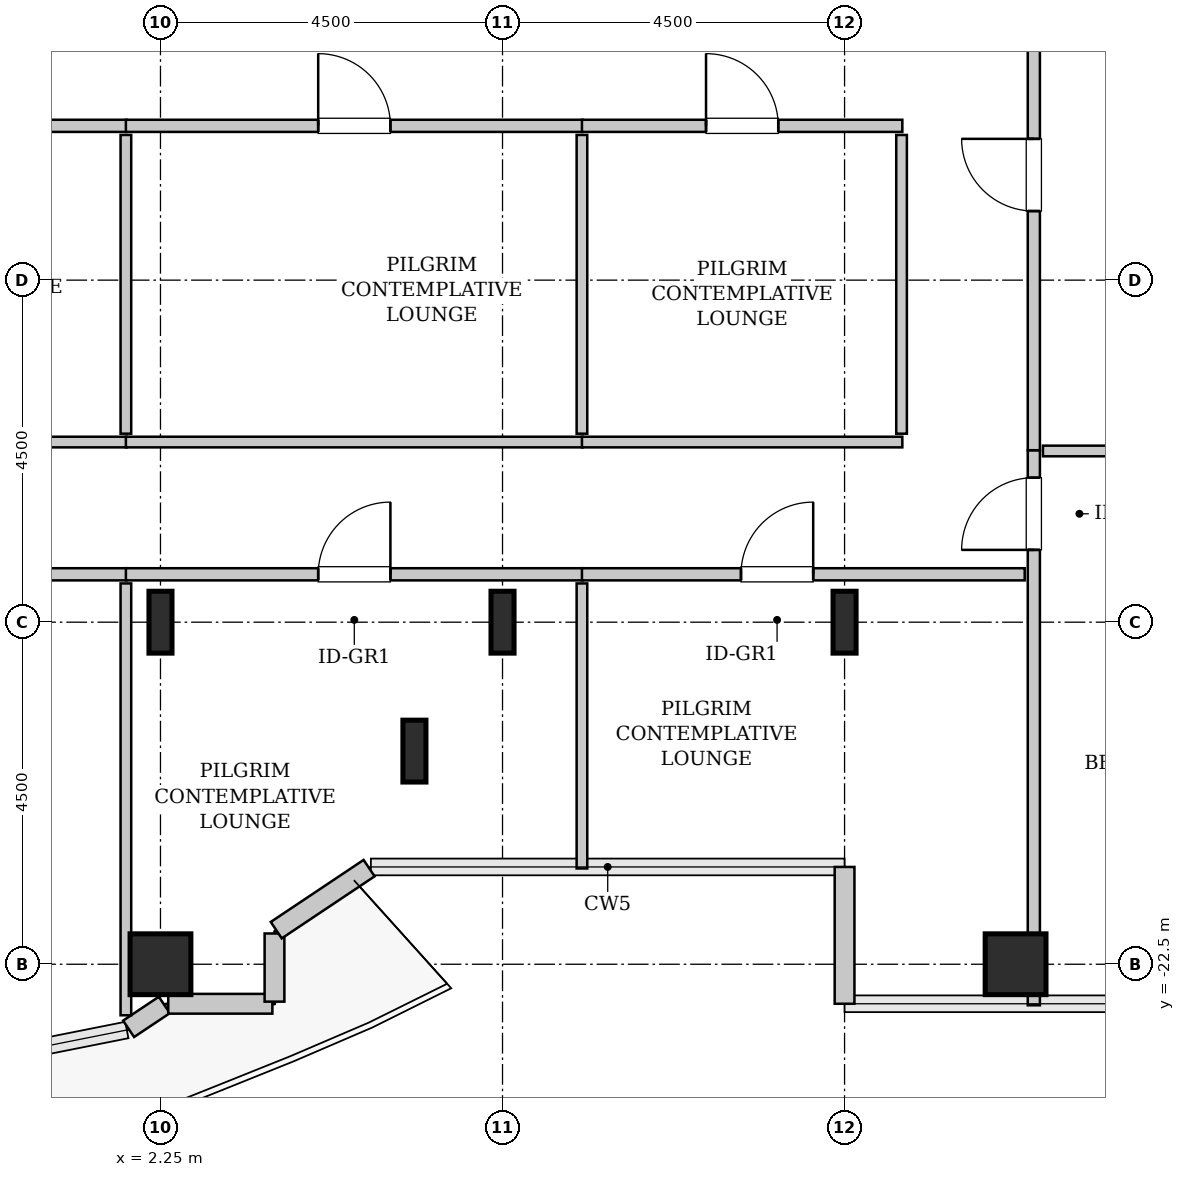
"""IFC4 building model, lengths in metres.
Left out: names, types, materials, properties, quantities, classifications, styles, units other than length and angle.
Written with IfcOpenShell. Run it as: python <this file> out.ifc"""

import sys

from ifc_helpers import new_model, si_unit, direction, frame, frame_2d, origin, origin_2d, place, context, subcontext, project, spatial, rectangle, hollow_rectangle, i_section, extrude, source, transform, mapped, element, fill, save


model = new_model("IFC4")
c1 = context("Model", 3, precision=1e-05, world=origin(), true_north=direction((0.0, 1.0)))
c2 = subcontext(c1, "Body", "Model", "MODEL_VIEW")
j1 = project(units=[si_unit("LENGTHUNIT", "METRE"), si_unit("PLANEANGLEUNIT", "RADIAN")], contexts=[c1])
p1 = place(None, origin())
s1 = spatial("IfcSite", under=j1, at=p1, CompositionType="ELEMENT")
p2 = place(p1, origin())
s2 = spatial("IfcBuilding", under=s1, at=p2, CompositionType="ELEMENT")
p3 = place(p2, frame((0.0, 0.0, 171.6)))
s3 = spatial("IfcBuildingStorey", under=s2, at=p3, CompositionType="ELEMENT", Elevation=171.6)
m1 = source(origin(), c2, "Body", "SweptSolid", [
    extrude(hollow_rectangle(XDim=0.8, YDim=0.8, WallThickness=0.04, InnerFilletRadius=0.04, OuterFilletRadius=0.08, at=origin_2d()), origin(), (0.0, 0.0, 1.0), 3.8),
])
p4 = place(p3, frame((2.25, -22.5, 0.0), z_axis=(0.0, 0.0, 1.0), x_axis=(1.0, 0.0, 0.0)))
e1 = element("IfcColumn", 1, at=p4, inside=s3, PredefinedType="COLUMN", context=c2, shape_type="MappedRepresentation", body=[
    mapped(m1, transform((0.0, 0.0, 0.0), x_axis=(1.0, 0.0, 0.0), y_axis=(0.0, 1.0, 0.0), z_axis=(0.0, 0.0, 1.0), scale=1.0)),
])
m2 = source(origin(), c2, "Body", "SweptSolid", [
    extrude(i_section(OverallWidth=0.303, OverallDepth=0.814, WebThickness=0.021, FlangeThickness=0.04, FilletRadius=0.03, at=origin_2d()), origin(), (0.0, 0.0, 1.0), 3.8),
])
for number, where, z_axis, x_axis in (
    (2, (2.25, -18.0, 0.0), (0.0, 0.0, 1.0), (1.0, 0.0, 0.0)),
    (3, (5.591, -19.696, 0.0), (0.0, 0.0, 1.0), (1.0, 0.0, 0.0)),
    (4, (6.75, -18.0, 0.0), (0.0, 0.0, 1.0), (1.0, 0.0, 0.0)),
    (5, (11.25, -18.0, 0.0), (0.0, 0.0, 1.0), (1.0, 0.0, 0.0)),
):
    element("IfcColumn", number, at=place(p3, frame(where, z_axis=z_axis, x_axis=x_axis)), inside=s3, PredefinedType="COLUMN", context=c2, shape_type="MappedRepresentation", body=[
        mapped(m2, transform((0.0, 0.0, 0.0), x_axis=(1.0, 0.0, 0.0), y_axis=(0.0, 1.0, 0.0), z_axis=(0.0, 0.0, 1.0), scale=1.0)),
    ])
p5 = place(p3, frame((13.5, -22.5, 0.0), z_axis=(0.0, 0.0, 1.0), x_axis=(1.0, 0.0, 0.0)))
e6 = element("IfcColumn", 6, at=p5, inside=s3, PredefinedType="COLUMN", context=c2, shape_type="MappedRepresentation", body=[
    mapped(m1, transform((0.0, 0.0, 0.0), x_axis=(1.0, 0.0, 0.0), y_axis=(0.0, 1.0, 0.0), z_axis=(0.0, 0.0, 1.0), scale=1.0)),
])
m3 = source(origin(), c2, "Body", "SweptSolid", [
    extrude(rectangle(XDim=1.8, YDim=0.26, at=frame_2d((0.9, 0.0))), origin(), (0.0, 0.0, 1.0), 3.55),
])
p6 = place(p3, frame((11.25, -21.22, 0.0), z_axis=(0.0, 0.0, 1.0), x_axis=(0.0, -1.0, 0.0)))
e7 = element("IfcWall", 7, at=p6, inside=s3, PredefinedType="SOLIDWALL", context=c2, shape_type="MappedRepresentation", body=[
    mapped(m3, transform((0.0, 0.0, 0.0), x_axis=(1.0, 0.0, 0.0), y_axis=(0.0, 1.0, 0.0), z_axis=(0.0, 0.0, 1.0), scale=1.0)),
])
m4 = source(origin(), c2, "Body", "SweptSolid", [
    extrude(rectangle(XDim=0.565, YDim=0.26, at=frame_2d((0.283, 0.0))), origin(), (0.0, 0.0, 1.0), 3.55),
])
p7 = place(p3, frame((1.831, -23.35, 0.0), z_axis=(0.0, 0.0, 1.0), x_axis=(0.831651492666, 0.555297933317, 0.0)))
e8 = element("IfcWall", 8, at=p7, inside=s3, PredefinedType="SOLIDWALL", context=c2, shape_type="MappedRepresentation", body=[
    mapped(m4, transform((0.0, 0.0, 0.0), x_axis=(1.0, 0.0, 0.0), y_axis=(0.0, 1.0, 0.0), z_axis=(0.0, 0.0, 1.0), scale=1.0)),
])
m5 = source(origin(), c2, "Body", "SweptSolid", [
    extrude(rectangle(XDim=1.37, YDim=0.26, at=frame_2d((0.685, 0.0))), origin(), (0.0, 0.0, 1.0), 3.55),
])
p8 = place(p3, frame((2.352, -23.02, 0.0), z_axis=(0.0, 0.0, 1.0), x_axis=(1.0, 0.0, 0.0)))
e9 = element("IfcWall", 9, at=p8, inside=s3, PredefinedType="SOLIDWALL", context=c2, shape_type="MappedRepresentation", body=[
    mapped(m5, transform((0.0, 0.0, 0.0), x_axis=(1.0, 0.0, 0.0), y_axis=(0.0, 1.0, 0.0), z_axis=(0.0, 0.0, 1.0), scale=1.0)),
])
m6 = source(origin(), c2, "Body", "SweptSolid", [
    extrude(rectangle(XDim=0.897, YDim=0.26, at=frame_2d((0.448, 0.0))), origin(), (0.0, 0.0, 1.0), 3.55),
])
p9 = place(p3, frame((3.75, -22.992, 0.0), z_axis=(0.0, 0.0, 1.0), x_axis=(0.0, 1.0, 0.0)))
e10 = element("IfcWall", 10, at=p9, inside=s3, PredefinedType="SOLIDWALL", context=c2, shape_type="MappedRepresentation", body=[
    mapped(m6, transform((0.0, 0.0, 0.0), x_axis=(1.0, 0.0, 0.0), y_axis=(0.0, 1.0, 0.0), z_axis=(0.0, 0.0, 1.0), scale=1.0)),
])
m7 = source(origin(), c2, "Body", "SweptSolid", [
    extrude(rectangle(XDim=1.469, YDim=0.26, at=frame_2d((0.734, 0.0))), origin(), (0.0, 0.0, 1.0), 3.55),
])
p10 = place(p3, frame((3.773, -22.052, 0.0), z_axis=(0.0, 0.0, 1.0), x_axis=(0.831461760506, 0.555581983884, 0.0)))
e11 = element("IfcWall", 11, at=p10, inside=s3, PredefinedType="SOLIDWALL", context=c2, shape_type="MappedRepresentation", body=[
    mapped(m7, transform((0.0, 0.0, 0.0), x_axis=(1.0, 0.0, 0.0), y_axis=(0.0, 1.0, 0.0), z_axis=(0.0, 0.0, 1.0), scale=1.0)),
])
m8 = source(origin(), c2, "Body", "SweptSolid", [
    extrude(rectangle(XDim=7.302, YDim=0.16, at=frame_2d((3.651, 0.0))), origin(), (0.0, 0.0, 1.0), 3.535),
])
p11 = place(p3, frame((13.74, -23.04, 0.0), z_axis=(0.0, 0.0, 1.0), x_axis=(0.0, 1.0, 0.0)))
e12 = element("IfcWall", 12, at=p11, inside=s3, PredefinedType="PARTITIONING", context=c2, shape_type="MappedRepresentation", body=[
    mapped(m8, transform((0.0, 0.0, 0.0), x_axis=(1.0, 0.0, 0.0), y_axis=(0.0, 1.0, 0.0), z_axis=(0.0, 0.0, 1.0), scale=1.0)),
])
p12 = place(p11, frame((5.991, 0.0, 0.0)))
e13 = element("IfcOpeningElement", 13, at=p12, cuts=e12, PredefinedType="OPENING", context=c2, shape_type="SweptSolid", body=[
    extrude(rectangle(XDim=0.95, YDim=2.1, at=frame_2d((0.475, 1.05))), frame((0.0, 0.09, 0.0), z_axis=(0.0, -1.0, 0.0), x_axis=(1.0, 0.0, 0.0)), (0.0, 0.0, 1.0), 0.18),
])
m9 = source(origin(), c2, "Body", "SweptSolid", [
    extrude(rectangle(XDim=11.43, YDim=0.14, at=frame_2d((5.715, 0.0))), origin(), (0.0, 0.0, 1.0), 3.535),
])
p13 = place(p3, frame((13.86, -15.748, 0.0), z_axis=(0.0, 0.0, 1.0), x_axis=(1.0, 0.0, 0.0)))
e14 = element("IfcWall", 14, at=p13, inside=s3, PredefinedType="PARTITIONING", context=c2, shape_type="MappedRepresentation", body=[
    mapped(m9, transform((0.0, 0.0, 0.0), x_axis=(1.0, 0.0, 0.0), y_axis=(0.0, 1.0, 0.0), z_axis=(0.0, 0.0, 1.0), scale=1.0)),
])
m10 = source(origin(), c2, "Body", "SweptSolid", [
    extrude(rectangle(XDim=7.242, YDim=0.16, at=frame_2d((3.621, 0.0))), origin(), (0.0, 0.0, 1.0), 3.535),
])
p14 = place(p3, frame((13.74, -15.738, 0.0), z_axis=(0.0, 0.0, 1.0), x_axis=(0.0, 1.0, 0.0)))
e15 = element("IfcWall", 15, at=p14, inside=s3, PredefinedType="PARTITIONING", context=c2, shape_type="MappedRepresentation", body=[
    mapped(m10, transform((0.0, 0.0, 0.0), x_axis=(1.0, 0.0, 0.0), y_axis=(0.0, 1.0, 0.0), z_axis=(0.0, 0.0, 1.0), scale=1.0)),
])
p15 = place(p14, frame((3.146, 0.0, 0.0)))
e16 = element("IfcOpeningElement", 16, at=p15, cuts=e15, PredefinedType="OPENING", context=c2, shape_type="SweptSolid", body=[
    extrude(rectangle(XDim=0.95, YDim=2.1, at=frame_2d((0.475, 1.05))), frame((0.0, 0.09, 0.0), z_axis=(0.0, -1.0, 0.0), x_axis=(1.0, 0.0, 0.0)), (0.0, 0.0, 1.0), 0.18),
])
m11 = source(origin(), c2, "Body", "SweptSolid", [
    extrude(rectangle(XDim=7.01, YDim=0.16, at=frame_2d((3.505, 0.0))), origin(), (0.0, 0.0, 1.0), 3.535),
])
p16 = place(p3, frame((-5.205, -17.37, 0.0), z_axis=(0.0, 0.0, 1.0), x_axis=(1.0, 0.0, 0.0)))
e17 = element("IfcWall", 17, at=p16, inside=s3, PredefinedType="PARTITIONING", context=c2, shape_type="MappedRepresentation", body=[
    mapped(m11, transform((0.0, 0.0, 0.0), x_axis=(1.0, 0.0, 0.0), y_axis=(0.0, 1.0, 0.0), z_axis=(0.0, 0.0, 1.0), scale=1.0)),
])
p17 = place(p16, frame((3.47, 0.0, 0.0)))
e18 = element("IfcOpeningElement", 18, at=p17, cuts=e17, PredefinedType="OPENING", context=c2, shape_type="SweptSolid", body=[
    extrude(rectangle(XDim=0.95, YDim=2.1, at=frame_2d((0.475, 1.05))), frame((0.0, 0.09, 0.0), z_axis=(0.0, -1.0, 0.0), x_axis=(1.0, 0.0, 0.0)), (0.0, 0.0, 1.0), 0.18),
])
m12 = source(origin(), c2, "Body", "SweptSolid", [
    extrude(rectangle(XDim=5.681, YDim=0.14, at=frame_2d((2.841, 0.0))), origin(), (0.0, 0.0, 1.0), 2.875),
])
p18 = place(p3, frame((1.795, -23.171, 0.0), z_axis=(0.0, 0.0, 1.0), x_axis=(0.0, 1.0, 0.0)))
e19 = element("IfcWall", 19, at=p18, inside=s3, PredefinedType="PARTITIONING", context=c2, shape_type="MappedRepresentation", body=[
    mapped(m12, transform((0.0, 0.0, 0.0), x_axis=(1.0, 0.0, 0.0), y_axis=(0.0, 1.0, 0.0), z_axis=(0.0, 0.0, 1.0), scale=1.0)),
])
p19 = place(p3, frame((-5.205, -11.47, 0.0), z_axis=(0.0, 0.0, 1.0), x_axis=(1.0, 0.0, 0.0)))
e20 = element("IfcWall", 20, at=p19, inside=s3, PredefinedType="PARTITIONING", context=c2, shape_type="MappedRepresentation", body=[
    mapped(m11, transform((0.0, 0.0, 0.0), x_axis=(1.0, 0.0, 0.0), y_axis=(0.0, 1.0, 0.0), z_axis=(0.0, 0.0, 1.0), scale=1.0)),
])
p20 = place(p19, frame((3.03, 0.0, 0.0)))
e21 = element("IfcOpeningElement", 21, at=p20, cuts=e20, PredefinedType="OPENING", context=c2, shape_type="SweptSolid", body=[
    extrude(rectangle(XDim=0.95, YDim=2.1, at=frame_2d((0.475, 1.05))), frame((0.0, 0.09, 0.0), z_axis=(0.0, -1.0, 0.0), x_axis=(1.0, 0.0, 0.0)), (0.0, 0.0, 1.0), 0.18),
])
m13 = source(origin(), c2, "Body", "SweptSolid", [
    extrude(rectangle(XDim=7.01, YDim=0.14, at=frame_2d((3.505, 0.0))), origin(), (0.0, 0.0, 1.0), 3.535),
])
p21 = place(p3, frame((-5.205, -15.63, 0.0), z_axis=(0.0, 0.0, 1.0), x_axis=(1.0, 0.0, 0.0)))
e22 = element("IfcWall", 22, at=p21, inside=s3, PredefinedType="PARTITIONING", context=c2, shape_type="MappedRepresentation", body=[
    mapped(m13, transform((0.0, 0.0, 0.0), x_axis=(1.0, 0.0, 0.0), y_axis=(0.0, 1.0, 0.0), z_axis=(0.0, 0.0, 1.0), scale=1.0)),
])
m14 = source(origin(), c2, "Body", "SweptSolid", [
    extrude(rectangle(XDim=3.93, YDim=0.14, at=frame_2d((1.965, 0.0))), origin(), (0.0, 0.0, 1.0), 3.535),
])
p22 = place(p3, frame((1.795, -15.52, 0.0), z_axis=(0.0, 0.0, 1.0), x_axis=(0.0, 1.0, 0.0)))
e23 = element("IfcWall", 23, at=p22, inside=s3, PredefinedType="PARTITIONING", context=c2, shape_type="MappedRepresentation", body=[
    mapped(m14, transform((0.0, 0.0, 0.0), x_axis=(1.0, 0.0, 0.0), y_axis=(0.0, 1.0, 0.0), z_axis=(0.0, 0.0, 1.0), scale=1.0)),
])
m15 = source(origin(), c2, "Body", "SweptSolid", [
    extrude(rectangle(XDim=6.01, YDim=0.16, at=frame_2d((3.005, 0.0))), origin(), (0.0, 0.0, 1.0), 3.535),
])
p23 = place(p3, frame((1.795, -17.37, 0.0), z_axis=(0.0, 0.0, 1.0), x_axis=(1.0, 0.0, 0.0)))
e24 = element("IfcWall", 24, at=p23, inside=s3, PredefinedType="PARTITIONING", context=c2, shape_type="MappedRepresentation", body=[
    mapped(m15, transform((0.0, 0.0, 0.0), x_axis=(1.0, 0.0, 0.0), y_axis=(0.0, 1.0, 0.0), z_axis=(0.0, 0.0, 1.0), scale=1.0)),
])
p24 = place(p23, frame((2.53, 0.0, 0.0)))
e25 = element("IfcOpeningElement", 25, at=p24, cuts=e24, PredefinedType="OPENING", context=c2, shape_type="SweptSolid", body=[
    extrude(rectangle(XDim=0.95, YDim=2.1, at=frame_2d((0.475, 1.05))), frame((0.0, 0.09, 0.0), z_axis=(0.0, -1.0, 0.0), x_axis=(1.0, 0.0, 0.0)), (0.0, 0.0, 1.0), 0.18),
])
m16 = source(origin(), c2, "Body", "SweptSolid", [
    extrude(rectangle(XDim=3.75, YDim=0.14, at=frame_2d((1.875, 0.0))), origin(), (0.0, 0.0, 1.0), 3.535),
])
p25 = place(p3, frame((7.795, -21.24, 0.0), z_axis=(0.0, 0.0, 1.0), x_axis=(0.0, 1.0, 0.0)))
e26 = element("IfcWall", 26, at=p25, inside=s3, PredefinedType="PARTITIONING", context=c2, shape_type="MappedRepresentation", body=[
    mapped(m16, transform((0.0, 0.0, 0.0), x_axis=(1.0, 0.0, 0.0), y_axis=(0.0, 1.0, 0.0), z_axis=(0.0, 0.0, 1.0), scale=1.0)),
])
p26 = place(p3, frame((1.795, -11.47, 0.0), z_axis=(0.0, 0.0, 1.0), x_axis=(1.0, 0.0, 0.0)))
e27 = element("IfcWall", 27, at=p26, inside=s3, PredefinedType="PARTITIONING", context=c2, shape_type="MappedRepresentation", body=[
    mapped(m15, transform((0.0, 0.0, 0.0), x_axis=(1.0, 0.0, 0.0), y_axis=(0.0, 1.0, 0.0), z_axis=(0.0, 0.0, 1.0), scale=1.0)),
])
p27 = place(p26, frame((2.53, 0.0, 0.0)))
e28 = element("IfcOpeningElement", 28, at=p27, cuts=e27, PredefinedType="OPENING", context=c2, shape_type="SweptSolid", body=[
    extrude(rectangle(XDim=0.95, YDim=2.1, at=frame_2d((0.475, 1.05))), frame((0.0, 0.09, 0.0), z_axis=(0.0, -1.0, 0.0), x_axis=(1.0, 0.0, 0.0)), (0.0, 0.0, 1.0), 0.18),
])
m17 = source(origin(), c2, "Body", "SweptSolid", [
    extrude(rectangle(XDim=6.01, YDim=0.14, at=frame_2d((3.005, 0.0))), origin(), (0.0, 0.0, 1.0), 3.535),
])
p28 = place(p3, frame((1.795, -15.63, 0.0), z_axis=(0.0, 0.0, 1.0), x_axis=(1.0, 0.0, 0.0)))
e29 = element("IfcWall", 29, at=p28, inside=s3, PredefinedType="PARTITIONING", context=c2, shape_type="MappedRepresentation", body=[
    mapped(m17, transform((0.0, 0.0, 0.0), x_axis=(1.0, 0.0, 0.0), y_axis=(0.0, 1.0, 0.0), z_axis=(0.0, 0.0, 1.0), scale=1.0)),
])
p29 = place(p3, frame((7.795, -15.52, 0.0), z_axis=(0.0, 0.0, 1.0), x_axis=(0.0, 1.0, 0.0)))
e30 = element("IfcWall", 30, at=p29, inside=s3, PredefinedType="PARTITIONING", context=c2, shape_type="MappedRepresentation", body=[
    mapped(m14, transform((0.0, 0.0, 0.0), x_axis=(1.0, 0.0, 0.0), y_axis=(0.0, 1.0, 0.0), z_axis=(0.0, 0.0, 1.0), scale=1.0)),
])
m18 = source(origin(), c2, "Body", "SweptSolid", [
    extrude(rectangle(XDim=5.825, YDim=0.16, at=frame_2d((2.913, 0.0))), origin(), (0.0, 0.0, 1.0), 3.535),
])
p30 = place(p3, frame((7.795, -17.37, 0.0), z_axis=(0.0, 0.0, 1.0), x_axis=(1.0, 0.0, 0.0)))
e31 = element("IfcWall", 31, at=p30, inside=s3, PredefinedType="PARTITIONING", context=c2, shape_type="MappedRepresentation", body=[
    mapped(m18, transform((0.0, 0.0, 0.0), x_axis=(1.0, 0.0, 0.0), y_axis=(0.0, 1.0, 0.0), z_axis=(0.0, 0.0, 1.0), scale=1.0)),
])
p31 = place(p30, frame((2.092, 0.0, 0.0)))
e32 = element("IfcOpeningElement", 32, at=p31, cuts=e31, PredefinedType="OPENING", context=c2, shape_type="SweptSolid", body=[
    extrude(rectangle(XDim=0.95, YDim=2.1, at=frame_2d((0.475, 1.05))), frame((0.0, 0.09, 0.0), z_axis=(0.0, -1.0, 0.0), x_axis=(1.0, 0.0, 0.0)), (0.0, 0.0, 1.0), 0.18),
])
m19 = source(origin(), c2, "Body", "SweptSolid", [
    extrude(rectangle(XDim=4.215, YDim=0.16, at=frame_2d((2.107, 0.0))), origin(), (0.0, 0.0, 1.0), 3.535),
])
p32 = place(p3, frame((7.795, -11.47, 0.0), z_axis=(0.0, 0.0, 1.0), x_axis=(1.0, 0.0, 0.0)))
e33 = element("IfcWall", 33, at=p32, inside=s3, PredefinedType="PARTITIONING", context=c2, shape_type="MappedRepresentation", body=[
    mapped(m19, transform((0.0, 0.0, 0.0), x_axis=(1.0, 0.0, 0.0), y_axis=(0.0, 1.0, 0.0), z_axis=(0.0, 0.0, 1.0), scale=1.0)),
])
p33 = place(p32, frame((1.633, 0.0, 0.0)))
e34 = element("IfcOpeningElement", 34, at=p33, cuts=e33, PredefinedType="OPENING", context=c2, shape_type="SweptSolid", body=[
    extrude(rectangle(XDim=0.95, YDim=2.1, at=frame_2d((0.475, 1.05))), frame((0.0, 0.09, 0.0), z_axis=(0.0, -1.0, 0.0), x_axis=(1.0, 0.0, 0.0)), (0.0, 0.0, 1.0), 0.18),
])
m20 = source(origin(), c2, "Body", "SweptSolid", [
    extrude(rectangle(XDim=4.215, YDim=0.14, at=frame_2d((2.107, 0.0))), origin(), (0.0, 0.0, 1.0), 3.535),
])
p34 = place(p3, frame((7.795, -15.63, 0.0), z_axis=(0.0, 0.0, 1.0), x_axis=(1.0, 0.0, 0.0)))
e35 = element("IfcWall", 35, at=p34, inside=s3, PredefinedType="PARTITIONING", context=c2, shape_type="MappedRepresentation", body=[
    mapped(m20, transform((0.0, 0.0, 0.0), x_axis=(1.0, 0.0, 0.0), y_axis=(0.0, 1.0, 0.0), z_axis=(0.0, 0.0, 1.0), scale=1.0)),
])
p35 = place(p3, frame((12.0, -15.52, 0.0), z_axis=(0.0, 0.0, 1.0), x_axis=(0.0, 1.0, 0.0)))
e36 = element("IfcWall", 36, at=p35, inside=s3, PredefinedType="PARTITIONING", context=c2, shape_type="MappedRepresentation", body=[
    mapped(m14, transform((0.0, 0.0, 0.0), x_axis=(1.0, 0.0, 0.0), y_axis=(0.0, 1.0, 0.0), z_axis=(0.0, 0.0, 1.0), scale=1.0)),
])
m21 = source(origin(), c2, "Body", "SweptSolid", [
    extrude(rectangle(XDim=0.95, YDim=2.1, at=frame_2d((0.475, 1.05))), frame((0.0, 0.025, 0.0), z_axis=(0.0, -1.0, 0.0), x_axis=(1.0, 0.0, 0.0)), (0.0, 0.0, 1.0), 0.05),
])
p36 = place(p12, origin())
e37 = element("IfcDoor", 37, at=p36, inside=s3, OperationType="SINGLE_SWING_LEFT", PredefinedType="DOOR", context=c2, shape_type="MappedRepresentation", body=[
    mapped(m21, transform((0.0, 0.0, 0.0), x_axis=(1.0, 0.0, 0.0), y_axis=(0.0, 1.0, 0.0), z_axis=(0.0, 0.0, 1.0), scale=1.0)),
])
fill(e13, e37)
p37 = place(p15, origin())
e38 = element("IfcDoor", 38, at=p37, inside=s3, OperationType="SINGLE_SWING_RIGHT", PredefinedType="DOOR", context=c2, shape_type="MappedRepresentation", body=[
    mapped(m21, transform((0.0, 0.0, 0.0), x_axis=(1.0, 0.0, 0.0), y_axis=(0.0, 1.0, 0.0), z_axis=(0.0, 0.0, 1.0), scale=1.0)),
])
fill(e16, e38)
p38 = place(p24, origin())
e39 = element("IfcDoor", 39, at=p38, inside=s3, OperationType="SINGLE_SWING_RIGHT", PredefinedType="DOOR", context=c2, shape_type="MappedRepresentation", body=[
    mapped(m21, transform((0.0, 0.0, 0.0), x_axis=(1.0, 0.0, 0.0), y_axis=(0.0, 1.0, 0.0), z_axis=(0.0, 0.0, 1.0), scale=1.0)),
])
fill(e25, e39)
p39 = place(p27, origin())
e40 = element("IfcDoor", 40, at=p39, inside=s3, OperationType="SINGLE_SWING_LEFT", PredefinedType="DOOR", context=c2, shape_type="MappedRepresentation", body=[
    mapped(m21, transform((0.0, 0.0, 0.0), x_axis=(1.0, 0.0, 0.0), y_axis=(0.0, 1.0, 0.0), z_axis=(0.0, 0.0, 1.0), scale=1.0)),
])
fill(e28, e40)
p40 = place(p31, origin())
e41 = element("IfcDoor", 41, at=p40, inside=s3, OperationType="SINGLE_SWING_RIGHT", PredefinedType="DOOR", context=c2, shape_type="MappedRepresentation", body=[
    mapped(m21, transform((0.0, 0.0, 0.0), x_axis=(1.0, 0.0, 0.0), y_axis=(0.0, 1.0, 0.0), z_axis=(0.0, 0.0, 1.0), scale=1.0)),
])
fill(e32, e41)
p41 = place(p33, origin())
e42 = element("IfcDoor", 42, at=p41, inside=s3, OperationType="SINGLE_SWING_LEFT", PredefinedType="DOOR", context=c2, shape_type="MappedRepresentation", body=[
    mapped(m21, transform((0.0, 0.0, 0.0), x_axis=(1.0, 0.0, 0.0), y_axis=(0.0, 1.0, 0.0), z_axis=(0.0, 0.0, 1.0), scale=1.0)),
])
fill(e34, e42)
save(model, sys.argv[1])
